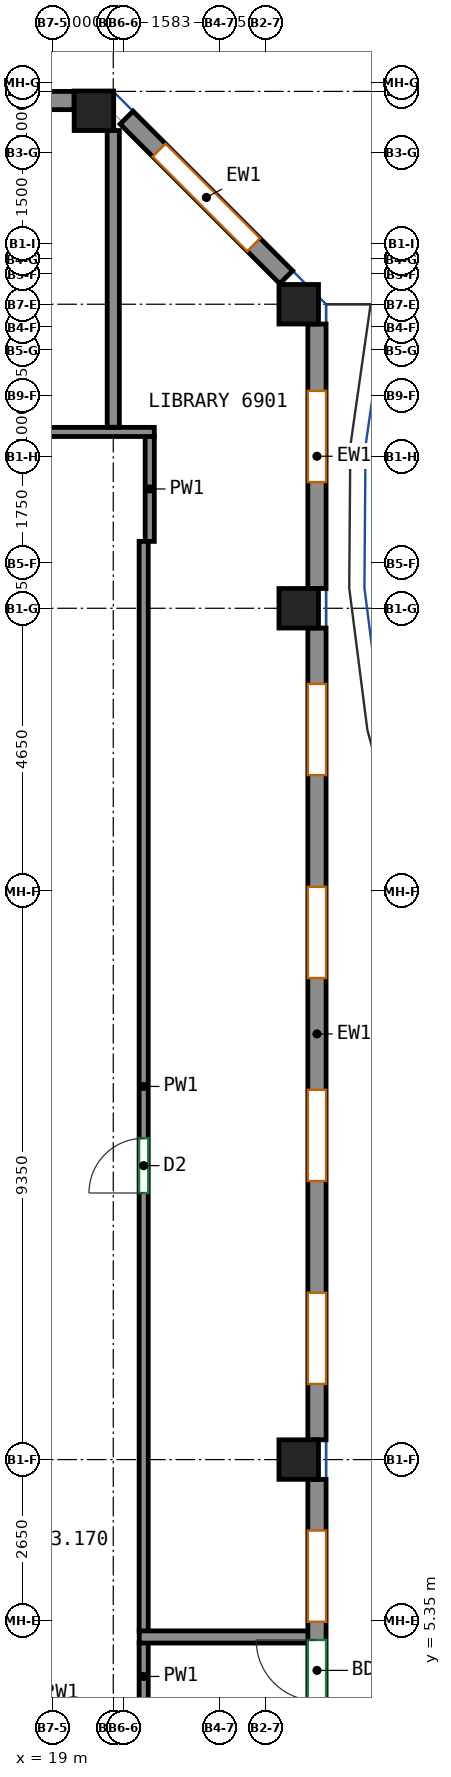
"""IFC4 building model, lengths in metres.
Left out: names, types, materials, properties, quantities, classifications, styles, units other than length and angle.
Written with IfcOpenShell. Run it as: python <this file> out.ifc"""

import sys

from ifc_helpers import new_model, si_unit, direction, frame, frame_2d, origin, origin_2d, place, context, subcontext, project, spatial, rectangle, extrude, source, transform, mapped, element, fill, save


model = new_model("IFC4")
c1 = context("Model", 3, precision=1e-05, world=origin(), true_north=direction((0.0, 1.0)))
c2 = subcontext(c1, "Body", "Model", "MODEL_VIEW")
j1 = project(units=[si_unit("LENGTHUNIT", "METRE"), si_unit("PLANEANGLEUNIT", "RADIAN")], contexts=[c1])
p1 = place(None, origin())
s1 = spatial("IfcSite", under=j1, at=p1, CompositionType="ELEMENT")
p2 = place(p1, origin())
s2 = spatial("IfcBuilding", under=s1, at=p2, CompositionType="ELEMENT")
p3 = place(p2, frame((0.0, 0.0, 280.6)))
s3 = spatial("IfcBuildingStorey", under=s2, at=p3, CompositionType="ELEMENT", Elevation=280.6)
m1 = source(origin(), c2, "Body", "SweptSolid", [
    extrude(rectangle(XDim=0.65, YDim=0.65, at=origin_2d()), origin(), (0.0, 0.0, 1.0), 3.12),
])
for number, where, z_axis, x_axis in (
    (1, (19.682, 30.182, 0.0), (0.0, 0.0, 1.0), (1.0, 0.0, 0.0)),
    (2, (23.05, 8.0, 0.0), (0.0, 0.0, 1.0), (1.0, 0.0, 0.0)),
    (3, (23.05, 22.0, 0.0), (0.0, 0.0, 1.0), (1.0, 0.0, 0.0)),
    (4, (23.05, 27.0, 0.0), (0.0, 0.0, 1.0), (1.0, 0.0, 0.0)),
):
    element("IfcColumn", number, at=place(p3, frame(where, z_axis=z_axis, x_axis=x_axis)), inside=s3, PredefinedType="COLUMN", context=c2, shape_type="MappedRepresentation", body=[
        mapped(m1, transform((0.0, 0.0, 0.0))),
    ])
m2 = source(origin(), c2, "Body", "SweptSolid", [
    extrude(rectangle(XDim=8.183, YDim=0.3, at=frame_2d((4.092, 0.0))), origin(), (0.0, 0.0, 1.0), 3.12),
])
p4 = place(p3, frame((23.35, -0.508, 0.0), z_axis=(0.0, 0.0, 1.0), x_axis=(0.0, 1.0, 0.0)))
e5 = element("IfcWall", 5, at=p4, inside=s3, PredefinedType="SOLIDWALL", context=c2, shape_type="MappedRepresentation", body=[
    mapped(m2, transform((0.0, 0.0, 0.0))),
])
p5 = place(p4, frame((1.75, 0.0, 0.8)))
e6 = element("IfcOpeningElement", 6, at=p5, cuts=e5, PredefinedType="OPENING", context=c2, shape_type="SweptSolid", body=[
    extrude(rectangle(XDim=1.5, YDim=2.05, at=frame_2d((0.75, 1.025))), frame((0.0, 0.16, 0.0), z_axis=(0.0, -1.0, 0.0), x_axis=(1.0, 0.0, 0.0)), (0.0, 0.0, 1.0), 0.32),
])
p6 = place(p4, frame((5.842, 0.0, 0.8)))
e7 = element("IfcOpeningElement", 7, at=p6, cuts=e5, PredefinedType="OPENING", context=c2, shape_type="SweptSolid", body=[
    extrude(rectangle(XDim=1.5, YDim=2.05, at=frame_2d((0.75, 1.025))), frame((0.0, 0.16, 0.0), z_axis=(0.0, -1.0, 0.0), x_axis=(1.0, 0.0, 0.0)), (0.0, 0.0, 1.0), 0.32),
])
p7 = place(p4, frame((4.542, 0.0, 0.0)))
e8 = element("IfcOpeningElement", 8, at=p7, cuts=e5, PredefinedType="OPENING", context=c2, shape_type="SweptSolid", body=[
    extrude(rectangle(XDim=1.0, YDim=2.1, at=frame_2d((0.5, 1.05))), frame((0.0, 0.16, 0.0), z_axis=(0.0, -1.0, 0.0), x_axis=(1.0, 0.0, 0.0)), (0.0, 0.0, 1.0), 0.32),
])
m3 = source(origin(), c2, "Body", "SweptSolid", [
    extrude(rectangle(XDim=13.35, YDim=0.3, at=frame_2d((6.675, 0.0))), origin(), (0.0, 0.0, 1.0), 3.12),
])
p8 = place(p3, frame((23.35, 8.325, 0.0), z_axis=(0.0, 0.0, 1.0), x_axis=(0.0, 1.0, 0.0)))
e9 = element("IfcWall", 9, at=p8, inside=s3, PredefinedType="SOLIDWALL", context=c2, shape_type="MappedRepresentation", body=[
    mapped(m3, transform((0.0, 0.0, 0.0))),
])
p9 = place(p8, frame((0.919, 0.0, 0.8)))
e10 = element("IfcOpeningElement", 10, at=p9, cuts=e9, PredefinedType="OPENING", context=c2, shape_type="SweptSolid", body=[
    extrude(rectangle(XDim=1.5, YDim=2.05, at=frame_2d((0.75, 1.025))), frame((0.0, 0.16, 0.0), z_axis=(0.0, -1.0, 0.0), x_axis=(1.0, 0.0, 0.0)), (0.0, 0.0, 1.0), 0.32),
])
p10 = place(p8, frame((4.256, 0.0, 0.8)))
e11 = element("IfcOpeningElement", 11, at=p10, cuts=e9, PredefinedType="OPENING", context=c2, shape_type="SweptSolid", body=[
    extrude(rectangle(XDim=1.5, YDim=2.05, at=frame_2d((0.75, 1.025))), frame((0.0, 0.16, 0.0), z_axis=(0.0, -1.0, 0.0), x_axis=(1.0, 0.0, 0.0)), (0.0, 0.0, 1.0), 0.32),
])
p11 = place(p8, frame((7.594, 0.0, 0.8)))
e12 = element("IfcOpeningElement", 12, at=p11, cuts=e9, PredefinedType="OPENING", context=c2, shape_type="SweptSolid", body=[
    extrude(rectangle(XDim=1.5, YDim=2.05, at=frame_2d((0.75, 1.025))), frame((0.0, 0.16, 0.0), z_axis=(0.0, -1.0, 0.0), x_axis=(1.0, 0.0, 0.0)), (0.0, 0.0, 1.0), 0.32),
])
p12 = place(p8, frame((10.931, 0.0, 0.8)))
e13 = element("IfcOpeningElement", 13, at=p12, cuts=e9, PredefinedType="OPENING", context=c2, shape_type="SweptSolid", body=[
    extrude(rectangle(XDim=1.5, YDim=2.05, at=frame_2d((0.75, 1.025))), frame((0.0, 0.16, 0.0), z_axis=(0.0, -1.0, 0.0), x_axis=(1.0, 0.0, 0.0)), (0.0, 0.0, 1.0), 0.32),
])
m4 = source(origin(), c2, "Body", "SweptSolid", [
    extrude(rectangle(XDim=4.35, YDim=0.3, at=frame_2d((2.175, 0.0))), origin(), (0.0, 0.0, 1.0), 3.12),
])
p13 = place(p3, frame((23.35, 22.325, 0.0), z_axis=(0.0, 0.0, 1.0), x_axis=(0.0, 1.0, 0.0)))
e14 = element("IfcWall", 14, at=p13, inside=s3, PredefinedType="SOLIDWALL", context=c2, shape_type="MappedRepresentation", body=[
    mapped(m4, transform((0.0, 0.0, 0.0))),
])
p14 = place(p13, frame((1.75, 0.0, 0.8)))
e15 = element("IfcOpeningElement", 15, at=p14, cuts=e14, PredefinedType="OPENING", context=c2, shape_type="SweptSolid", body=[
    extrude(rectangle(XDim=1.5, YDim=2.05, at=frame_2d((0.75, 1.025))), frame((0.0, 0.16, 0.0), z_axis=(0.0, -1.0, 0.0), x_axis=(1.0, 0.0, 0.0)), (0.0, 0.0, 1.0), 0.32),
])
m5 = source(origin(), c2, "Body", "SweptSolid", [
    extrude(rectangle(XDim=3.712, YDim=0.3, at=frame_2d((1.856, 0.0))), origin(), (0.0, 0.0, 1.0), 3.12),
])
p15 = place(p3, frame((22.844, 27.444, 0.0), z_axis=(0.0, 0.0, 1.0), x_axis=(-0.707106781187, 0.707106781187, 0.0)))
e16 = element("IfcWall", 16, at=p15, inside=s3, PredefinedType="SOLIDWALL", context=c2, shape_type="MappedRepresentation", body=[
    mapped(m5, transform((0.0, 0.0, 0.0))),
])
p16 = place(p15, frame((0.756, 0.0, 0.8)))
e17 = element("IfcOpeningElement", 17, at=p16, cuts=e16, PredefinedType="OPENING", context=c2, shape_type="SweptSolid", body=[
    extrude(rectangle(XDim=2.2, YDim=2.05, at=frame_2d((1.1, 1.025))), frame((0.0, 0.16, 0.0), z_axis=(0.0, -1.0, 0.0), x_axis=(1.0, 0.0, 0.0)), (0.0, 0.0, 1.0), 0.32),
])
m6 = source(origin(), c2, "Body", "SweptSolid", [
    extrude(rectangle(XDim=6.032, YDim=0.3, at=frame_2d((3.016, 0.0))), origin(), (0.0, 0.0, 1.0), 3.12),
])
p17 = place(p3, frame((19.357, 30.35, 0.0), z_axis=(0.0, 0.0, 1.0), x_axis=(-1.0, 0.0, 0.0)))
e18 = element("IfcWall", 18, at=p17, inside=s3, PredefinedType="SOLIDWALL", context=c2, shape_type="MappedRepresentation", body=[
    mapped(m6, transform((0.0, 0.0, 0.0))),
])
p18 = place(p17, frame((0.408, 0.0, 0.8)))
e19 = element("IfcOpeningElement", 19, at=p18, cuts=e18, PredefinedType="OPENING", context=c2, shape_type="SweptSolid", body=[
    extrude(rectangle(XDim=2.2, YDim=2.05, at=frame_2d((1.1, 1.025))), frame((0.0, 0.16, 0.0), z_axis=(0.0, -1.0, 0.0), x_axis=(1.0, 0.0, 0.0)), (0.0, 0.0, 1.0), 0.32),
])
p19 = place(p17, frame((3.424, 0.0, 0.8)))
e20 = element("IfcOpeningElement", 20, at=p19, cuts=e18, PredefinedType="OPENING", context=c2, shape_type="SweptSolid", body=[
    extrude(rectangle(XDim=2.2, YDim=2.05, at=frame_2d((1.1, 1.025))), frame((0.0, 0.16, 0.0), z_axis=(0.0, -1.0, 0.0), x_axis=(1.0, 0.0, 0.0)), (0.0, 0.0, 1.0), 0.32),
])
p20 = place(p3, frame((20.5, 3.875, 0.0), z_axis=(0.0, 0.0, 1.0), x_axis=(0.0, 1.0, 0.0)))
e21 = element("IfcWall", 21, at=p20, inside=s3, PredefinedType="PARTITIONING", context=c2, shape_type="SweptSolid", body=[
    extrude(rectangle(XDim=1.118, YDim=0.15, at=frame_2d((0.559, 0.0))), origin(), (0.0, 0.0, 1.0), 3.12),
])
p21 = place(p3, frame((20.6, 23.1, 0.0), z_axis=(0.0, 0.0, 1.0), x_axis=(0.0, 1.0, 0.0)))
e22 = element("IfcWall", 22, at=p21, inside=s3, PredefinedType="PARTITIONING", context=c2, shape_type="SweptSolid", body=[
    extrude(rectangle(XDim=1.725, YDim=0.15, at=frame_2d((0.862, 0.0))), origin(), (0.0, 0.0, 1.0), 3.12),
])
p22 = place(p3, frame((20.5, 5.173, 0.0), z_axis=(0.0, 0.0, 1.0), x_axis=(0.0, 1.0, 0.0)))
e23 = element("IfcWall", 23, at=p22, inside=s3, PredefinedType="PARTITIONING", context=c2, shape_type="SweptSolid", body=[
    extrude(rectangle(XDim=17.927, YDim=0.15, at=frame_2d((8.963, 0.0))), origin(), (0.0, 0.0, 1.0), 3.12),
])
p23 = place(p22, frame((7.211, 0.0, 0.0)))
e24 = element("IfcOpeningElement", 24, at=p23, cuts=e23, PredefinedType="OPENING", context=c2, shape_type="SweptSolid", body=[
    extrude(rectangle(XDim=0.9, YDim=2.1, at=frame_2d((0.45, 1.05))), frame((0.0, 0.085, 0.0), z_axis=(0.0, -1.0, 0.0), x_axis=(1.0, 0.0, 0.0)), (0.0, 0.0, 1.0), 0.17),
])
p24 = place(p3, frame((-19.075, 24.9, 0.0), z_axis=(0.0, 0.0, 1.0), x_axis=(1.0, 0.0, 0.0)))
e25 = element("IfcWall", 25, at=p24, inside=s3, PredefinedType="PARTITIONING", context=c2, shape_type="SweptSolid", body=[
    extrude(rectangle(XDim=39.75, YDim=0.15, at=frame_2d((19.875, 0.0))), origin(), (0.0, 0.0, 1.0), 3.12),
])
p25 = place(p24, frame((11.365, 0.0, 0.0)))
e26 = element("IfcOpeningElement", 26, at=p25, cuts=e25, PredefinedType="OPENING", context=c2, shape_type="SweptSolid", body=[
    extrude(rectangle(XDim=1.0, YDim=2.1, at=frame_2d((0.5, 1.05))), frame((0.0, 0.085, 0.0), z_axis=(0.0, -1.0, 0.0), x_axis=(1.0, 0.0, 0.0)), (0.0, 0.0, 1.0), 0.17),
])
p26 = place(p24, frame((33.379, 0.0, 0.0)))
e27 = element("IfcOpeningElement", 27, at=p26, cuts=e25, PredefinedType="OPENING", context=c2, shape_type="SweptSolid", body=[
    extrude(rectangle(XDim=0.9, YDim=2.1, at=frame_2d((0.45, 1.05))), frame((0.0, 0.085, 0.0), z_axis=(0.0, -1.0, 0.0), x_axis=(1.0, 0.0, 0.0)), (0.0, 0.0, 1.0), 0.17),
])
p27 = place(p3, frame((23.25, 5.083, 0.0), z_axis=(0.0, 0.0, 1.0), x_axis=(-1.0, 0.0, 0.0)))
e28 = element("IfcWall", 28, at=p27, inside=s3, PredefinedType="PARTITIONING", context=c2, shape_type="SweptSolid", body=[
    extrude(rectangle(XDim=2.823, YDim=0.2, at=frame_2d((1.412, 0.0))), origin(), (0.0, 0.0, 1.0), 3.12),
])
p28 = place(p3, frame((20.0, 29.857, 0.0), z_axis=(0.0, 0.0, 1.0), x_axis=(0.0, -1.0, 0.0)))
e29 = element("IfcWall", 29, at=p28, inside=s3, PredefinedType="PARTITIONING", context=c2, shape_type="SweptSolid", body=[
    extrude(rectangle(XDim=4.88, YDim=0.2, at=frame_2d((2.44, 0.0))), origin(), (0.0, 0.0, 1.0), 3.12),
])
p29 = place(p6, origin())
e30 = element("IfcWindow", 30, at=p29, inside=s3, PartitioningType="SINGLE_PANEL", PredefinedType="WINDOW", context=c2, shape_type="SweptSolid", body=[
    extrude(rectangle(XDim=1.5, YDim=2.05, at=frame_2d((0.75, 1.025))), frame((0.0, 0.03, 0.0), z_axis=(0.0, -1.0, 0.0), x_axis=(1.0, 0.0, 0.0)), (0.0, 0.0, 1.0), 0.06),
])
fill(e7, e30)
p30 = place(p7, origin())
e31 = element("IfcDoor", 31, at=p30, inside=s3, OperationType="SINGLE_SWING_RIGHT", PredefinedType="DOOR", context=c2, shape_type="SweptSolid", body=[
    extrude(rectangle(XDim=1.0, YDim=2.1, at=frame_2d((0.5, 1.05))), frame((0.0, 0.025, 0.0), z_axis=(0.0, -1.0, 0.0), x_axis=(1.0, 0.0, 0.0)), (0.0, 0.0, 1.0), 0.05),
])
fill(e8, e31)
p31 = place(p9, origin())
e32 = element("IfcWindow", 32, at=p31, inside=s3, PartitioningType="SINGLE_PANEL", PredefinedType="WINDOW", context=c2, shape_type="SweptSolid", body=[
    extrude(rectangle(XDim=1.5, YDim=2.05, at=frame_2d((0.75, 1.025))), frame((0.0, 0.03, 0.0), z_axis=(0.0, -1.0, 0.0), x_axis=(1.0, 0.0, 0.0)), (0.0, 0.0, 1.0), 0.06),
])
fill(e10, e32)
p32 = place(p10, origin())
e33 = element("IfcWindow", 33, at=p32, inside=s3, PartitioningType="SINGLE_PANEL", PredefinedType="WINDOW", context=c2, shape_type="SweptSolid", body=[
    extrude(rectangle(XDim=1.5, YDim=2.05, at=frame_2d((0.75, 1.025))), frame((0.0, 0.03, 0.0), z_axis=(0.0, -1.0, 0.0), x_axis=(1.0, 0.0, 0.0)), (0.0, 0.0, 1.0), 0.06),
])
fill(e11, e33)
p33 = place(p11, origin())
e34 = element("IfcWindow", 34, at=p33, inside=s3, PartitioningType="SINGLE_PANEL", PredefinedType="WINDOW", context=c2, shape_type="SweptSolid", body=[
    extrude(rectangle(XDim=1.5, YDim=2.05, at=frame_2d((0.75, 1.025))), frame((0.0, 0.03, 0.0), z_axis=(0.0, -1.0, 0.0), x_axis=(1.0, 0.0, 0.0)), (0.0, 0.0, 1.0), 0.06),
])
fill(e12, e34)
p34 = place(p12, origin())
e35 = element("IfcWindow", 35, at=p34, inside=s3, PartitioningType="SINGLE_PANEL", PredefinedType="WINDOW", context=c2, shape_type="SweptSolid", body=[
    extrude(rectangle(XDim=1.5, YDim=2.05, at=frame_2d((0.75, 1.025))), frame((0.0, 0.03, 0.0), z_axis=(0.0, -1.0, 0.0), x_axis=(1.0, 0.0, 0.0)), (0.0, 0.0, 1.0), 0.06),
])
fill(e13, e35)
p35 = place(p14, origin())
e36 = element("IfcWindow", 36, at=p35, inside=s3, PartitioningType="SINGLE_PANEL", PredefinedType="WINDOW", context=c2, shape_type="SweptSolid", body=[
    extrude(rectangle(XDim=1.5, YDim=2.05, at=frame_2d((0.75, 1.025))), frame((0.0, 0.03, 0.0), z_axis=(0.0, -1.0, 0.0), x_axis=(1.0, 0.0, 0.0)), (0.0, 0.0, 1.0), 0.06),
])
fill(e15, e36)
p36 = place(p16, origin())
e37 = element("IfcWindow", 37, at=p36, inside=s3, PartitioningType="SINGLE_PANEL", PredefinedType="WINDOW", context=c2, shape_type="SweptSolid", body=[
    extrude(rectangle(XDim=2.2, YDim=2.05, at=frame_2d((1.1, 1.025))), frame((0.0, 0.03, 0.0), z_axis=(0.0, -1.0, 0.0), x_axis=(1.0, 0.0, 0.0)), (0.0, 0.0, 1.0), 0.06),
])
fill(e17, e37)
p37 = place(p23, origin())
e38 = element("IfcDoor", 38, at=p37, inside=s3, OperationType="SINGLE_SWING_LEFT", PredefinedType="DOOR", context=c2, shape_type="SweptSolid", body=[
    extrude(rectangle(XDim=0.9, YDim=2.1, at=frame_2d((0.45, 1.05))), frame((0.0, 0.025, 0.0), z_axis=(0.0, -1.0, 0.0), x_axis=(1.0, 0.0, 0.0)), (0.0, 0.0, 1.0), 0.05),
])
fill(e24, e38)
save(model, sys.argv[1])
